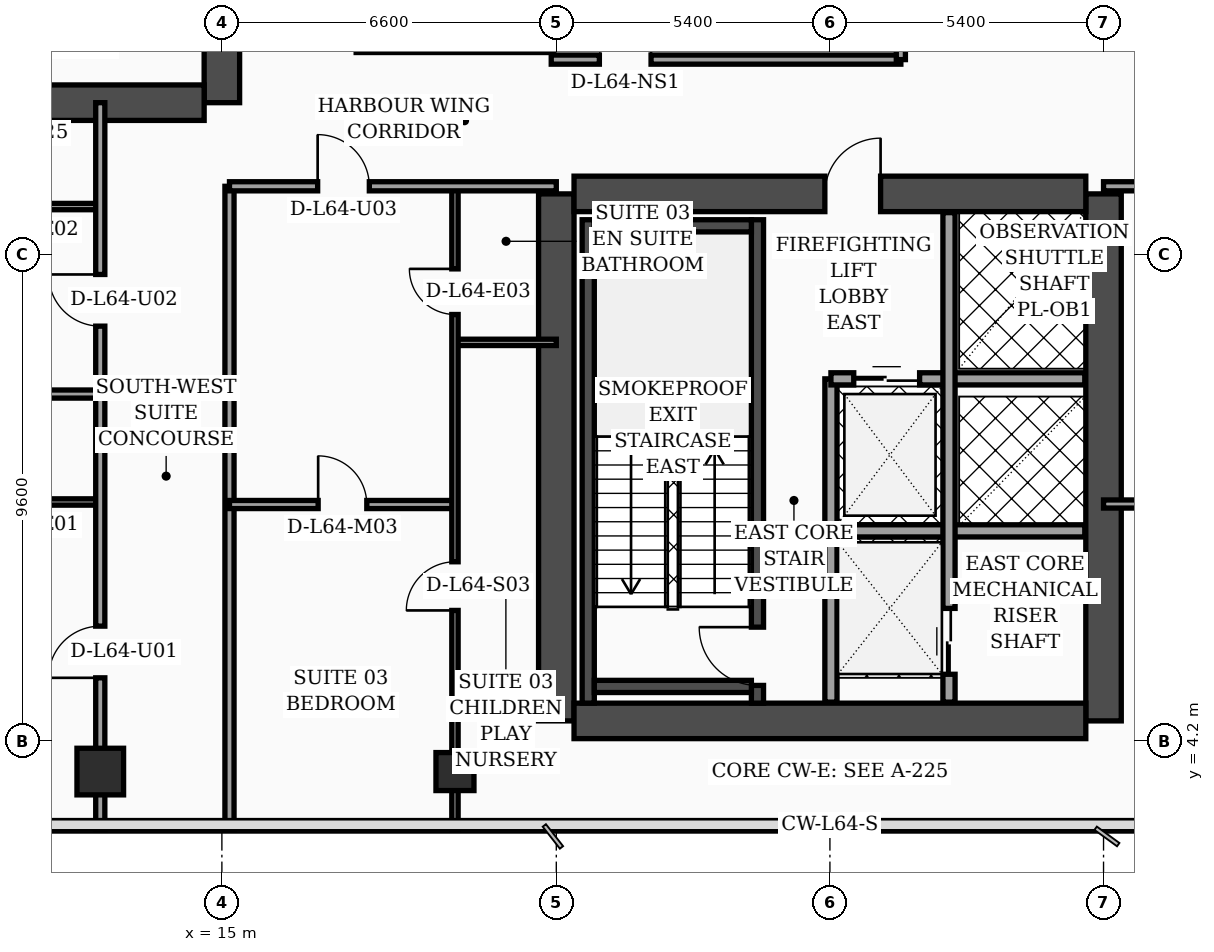
"""IFC4 building model, lengths in metres.
Left out: names, types, materials, properties, quantities, classifications, styles, units other than length and angle.
Written with IfcOpenShell. Run it as: python <this file> out.ifc"""

import sys

from ifc_helpers import new_model, si_unit, direction, frame, frame_2d, origin, origin_2d, place, context, subcontext, project, spatial, rectangle, hollow_rectangle, extrude, element, fill, save


model = new_model("IFC4")
c1 = context("Model", 3, precision=1e-05, world=origin(), true_north=direction((0.0, 1.0)))
c2 = subcontext(c1, "Body", "Model", "MODEL_VIEW")
j1 = project(units=[si_unit("LENGTHUNIT", "METRE"), si_unit("PLANEANGLEUNIT", "RADIAN")], contexts=[c1])
p1 = place(None, origin())
s1 = spatial("IfcSite", under=j1, at=p1, CompositionType="ELEMENT")
p2 = place(p1, origin())
s2 = spatial("IfcBuilding", under=s1, at=p2, CompositionType="ELEMENT")
p3 = place(p2, frame((0.0, 0.0, 259.0)))
s3 = spatial("IfcBuildingStorey", under=s2, at=p3, CompositionType="ELEMENT", Elevation=259.0)
p4 = place(p3, frame((15.0, 16.8, 0.0), z_axis=(0.0, 0.0, 1.0), x_axis=(0.0, 1.0, 0.0)))
e1 = element("IfcWall", 1, at=p4, inside=s3, PredefinedType="SHEAR", context=c2, shape_type="SweptSolid", body=[
    extrude(rectangle(XDim=21.6, YDim=0.7, at=frame_2d((10.8, 0.0))), origin(), (0.0, 0.0, 1.0), 4.05),
])
p5 = place(p4, frame((8.65, 0.0, 0.0)))
e2 = element("IfcOpeningElement", 2, at=p5, cuts=e1, PredefinedType="OPENING", context=c2, shape_type="SweptSolid", body=[
    extrude(rectangle(XDim=1.1, YDim=2.2, at=frame_2d((0.55, 1.1))), frame((0.0, 0.36, 0.0), z_axis=(0.0, -1.0, 0.0), x_axis=(1.0, 0.0, 0.0)), (0.0, 0.0, 1.0), 0.72),
])
p6 = place(p4, frame((18.9, 0.0, 0.0)))
e3 = element("IfcOpeningElement", 3, at=p6, cuts=e1, PredefinedType="OPENING", context=c2, shape_type="SweptSolid", body=[
    extrude(rectangle(XDim=1.1, YDim=2.2, at=frame_2d((0.55, 1.1))), frame((0.0, 0.36, 0.0), z_axis=(0.0, -1.0, 0.0), x_axis=(1.0, 0.0, 0.0)), (0.0, 0.0, 1.0), 0.72),
])
p7 = place(p3, frame((4.55, 16.8, 0.0), z_axis=(0.0, 0.0, 1.0), x_axis=(1.0, 0.0, 0.0)))
e4 = element("IfcWall", 4, at=p7, inside=s3, PredefinedType="SHEAR", context=c2, shape_type="SweptSolid", body=[
    extrude(rectangle(XDim=10.1, YDim=0.7, at=frame_2d((5.05, 0.0))), origin(), (0.0, 0.0, 1.0), 4.05),
])
for number, where, z_axis, x_axis in (
    (5, (21.6, 4.6, 0.0), (0.0, 0.0, 1.0), (0.0, 1.0, 0.0)),
    (6, (32.4, 4.6, 0.0), (0.0, 0.0, 1.0), (0.0, 1.0, 0.0)),
):
    element("IfcWall", number, at=place(p3, frame(where, z_axis=z_axis, x_axis=x_axis)), inside=s3, PredefinedType="SHEAR", context=c2, shape_type="SweptSolid", body=[
        extrude(rectangle(XDim=10.4, YDim=0.7, at=frame_2d((5.2, 0.0))), origin(), (0.0, 0.0, 1.0), 4.05),
    ])
p8 = place(p3, frame((21.95, 15.0, 0.0), z_axis=(0.0, 0.0, 1.0), x_axis=(1.0, 0.0, 0.0)))
e7 = element("IfcWall", 7, at=p8, inside=s3, PredefinedType="SHEAR", context=c2, shape_type="SweptSolid", body=[
    extrude(rectangle(XDim=10.1, YDim=0.7, at=frame_2d((5.05, 0.0))), origin(), (0.0, 0.0, 1.0), 4.05),
])
p9 = place(p8, frame((4.95, 0.0, 0.0)))
e8 = element("IfcOpeningElement", 8, at=p9, cuts=e7, PredefinedType="OPENING", context=c2, shape_type="SweptSolid", body=[
    extrude(rectangle(XDim=1.1, YDim=2.2, at=frame_2d((0.55, 1.1))), frame((0.0, 0.36, 0.0), z_axis=(0.0, -1.0, 0.0), x_axis=(1.0, 0.0, 0.0)), (0.0, 0.0, 1.0), 0.72),
])
p10 = place(p3, frame((21.95, 4.6, 0.0), z_axis=(0.0, 0.0, 1.0), x_axis=(1.0, 0.0, 0.0)))
e9 = element("IfcWall", 9, at=p10, inside=s3, PredefinedType="SHEAR", context=c2, shape_type="SweptSolid", body=[
    extrude(rectangle(XDim=10.1, YDim=0.7, at=frame_2d((5.05, 0.0))), origin(), (0.0, 0.0, 1.0), 4.05),
])
p11 = place(p3, frame((22.23, 4.95, 0.0), z_axis=(0.0, 0.0, 1.0), x_axis=(0.0, 1.0, 0.0)))
e10 = element("IfcWall", 10, at=p11, inside=s3, PredefinedType="SOLIDWALL", context=c2, shape_type="SweptSolid", body=[
    extrude(rectangle(XDim=9.54, YDim=0.24, at=frame_2d((4.77, 0.0))), origin(), (0.0, 0.0, 1.0), 4.05),
])
p12 = place(p3, frame((25.57, 4.95, 0.0), z_axis=(0.0, 0.0, 1.0), x_axis=(0.0, 1.0, 0.0)))
e11 = element("IfcWall", 11, at=p12, inside=s3, PredefinedType="SOLIDWALL", context=c2, shape_type="SweptSolid", body=[
    extrude(rectangle(XDim=9.54, YDim=0.24, at=frame_2d((4.77, 0.0))), origin(), (0.0, 0.0, 1.0), 4.05),
])
p13 = place(p12, frame((0.35, 0.0, 0.0)))
e12 = element("IfcOpeningElement", 12, at=p13, cuts=e11, PredefinedType="OPENING", context=c2, shape_type="SweptSolid", body=[
    extrude(rectangle(XDim=1.15, YDim=2.2, at=frame_2d((0.575, 1.1))), frame((0.0, 0.13, 0.0), z_axis=(0.0, -1.0, 0.0), x_axis=(1.0, 0.0, 0.0)), (0.0, 0.0, 1.0), 0.26),
])
for number, where, z_axis, x_axis in (
    (13, (22.35, 5.28, 0.0), (0.0, 0.0, 1.0), (1.0, 0.0, 0.0)),
    (14, (22.35, 14.37, 0.0), (0.0, 0.0, 1.0), (1.0, 0.0, 0.0)),
):
    element("IfcWall", number, at=place(p3, frame(where, z_axis=z_axis, x_axis=x_axis)), inside=s3, PredefinedType="SOLIDWALL", context=c2, shape_type="SweptSolid", body=[
        extrude(rectangle(XDim=3.1, YDim=0.24, at=frame_2d((1.55, 0.0))), origin(), (0.0, 0.0, 1.0), 4.05),
    ])
p14 = place(p3, frame((12.6, 3.6, 0.0), z_axis=(0.0, 0.0, 1.0), x_axis=(1.0, 0.0, 0.0)))
e15 = element("IfcColumn", 15, at=p14, inside=s3, PredefinedType="COLUMN", context=c2, shape_type="SweptSolid", body=[
    extrude(rectangle(XDim=0.92, YDim=0.92, at=origin_2d()), origin(), (0.0, 0.0, 1.0), 4.05),
])
p15 = place(p3, frame((19.6, 3.6, 0.0), z_axis=(0.0, 0.0, 1.0), x_axis=(1.0, 0.0, 0.0)))
e16 = element("IfcColumn", 16, at=p15, inside=s3, PredefinedType="COLUMN", context=c2, shape_type="SweptSolid", body=[
    extrude(hollow_rectangle(XDim=0.75, YDim=0.75, WallThickness=0.032, at=origin_2d()), origin(), (0.0, 0.0, 1.0), 4.05),
])
p16 = place(p3, frame((27.02, 4.97, 0.0), z_axis=(0.0, 0.0, 1.0), x_axis=(0.0, 1.0, 0.0)))
e17 = element("IfcWall", 17, at=p16, inside=s3, PredefinedType="SOLIDWALL", context=c2, shape_type="SweptSolid", body=[
    extrude(rectangle(XDim=6.38, YDim=0.24, at=frame_2d((3.19, 0.0))), origin(), (0.0, 0.0, 1.0), 4.05),
])
p17 = place(p3, frame((27.02, 11.35, 0.0), z_axis=(0.0, 0.0, 1.0), x_axis=(1.0, 0.0, 0.0)))
e18 = element("IfcWall", 18, at=p17, inside=s3, PredefinedType="SOLIDWALL", context=c2, shape_type="SweptSolid", body=[
    extrude(rectangle(XDim=5.01, YDim=0.24, at=frame_2d((2.505, 0.0))), origin(), (0.0, 0.0, 1.0), 4.05),
])
p18 = place(p17, frame((0.45, 0.0, 0.0)))
e19 = element("IfcOpeningElement", 19, at=p18, cuts=e18, PredefinedType="OPENING", context=c2, shape_type="SweptSolid", body=[
    extrude(rectangle(XDim=1.3, YDim=2.35, at=frame_2d((0.65, 1.175))), frame((0.0, 0.13, 0.0), z_axis=(0.0, -1.0, 0.0), x_axis=(1.0, 0.0, 0.0)), (0.0, 0.0, 1.0), 0.26),
])
p19 = place(p3, frame((27.02, 8.35, 0.0), z_axis=(0.0, 0.0, 1.0), x_axis=(1.0, 0.0, 0.0)))
e20 = element("IfcWall", 20, at=p19, inside=s3, PredefinedType="SOLIDWALL", context=c2, shape_type="SweptSolid", body=[
    extrude(rectangle(XDim=5.01, YDim=0.24, at=frame_2d((2.505, 0.0))), origin(), (0.0, 0.0, 1.0), 4.05),
])
p20 = place(p3, frame((29.35, 4.97, 0.0), z_axis=(0.0, 0.0, 1.0), x_axis=(0.0, 1.0, 0.0)))
e21 = element("IfcWall", 21, at=p20, inside=s3, PredefinedType="SOLIDWALL", context=c2, shape_type="SweptSolid", body=[
    extrude(rectangle(XDim=9.66, YDim=0.24, at=frame_2d((4.83, 0.0))), origin(), (0.0, 0.0, 1.0), 4.05),
])
p21 = place(p20, frame((0.55, 0.0, 0.0)))
e22 = element("IfcOpeningElement", 22, at=p21, cuts=e21, PredefinedType="OPENING", context=c2, shape_type="SweptSolid", body=[
    extrude(rectangle(XDim=1.3, YDim=2.35, at=frame_2d((0.65, 1.175))), frame((0.0, 0.13, 0.0), z_axis=(0.0, -1.0, 0.0), x_axis=(1.0, 0.0, 0.0)), (0.0, 0.0, 1.0), 0.26),
])
p22 = place(p3, frame((3.2, 8.92, 0.0), z_axis=(0.0, 0.0, 1.0), x_axis=(1.0, 0.0, 0.0)))
e23 = element("IfcWall", 23, at=p22, inside=s3, PredefinedType="PARTITIONING", context=c2, shape_type="SweptSolid", body=[
    extrude(rectangle(XDim=9.4, YDim=0.125, at=frame_2d((4.7, 0.0))), origin(), (0.0, 0.0, 1.0), 3.5),
])
p23 = place(p22, frame((3.3, 0.0, 0.0)))
e24 = element("IfcOpeningElement", 24, at=p23, cuts=e23, PredefinedType="OPENING", context=c2, shape_type="SweptSolid", body=[
    extrude(rectangle(XDim=0.96, YDim=2.2, at=frame_2d((0.48, 1.1))), frame((0.0, 0.073, 0.0), z_axis=(0.0, -1.0, 0.0), x_axis=(1.0, 0.0, 0.0)), (0.0, 0.0, 1.0), 0.145),
])
p24 = place(p22, frame((7.49, 0.0, 0.0)))
e25 = element("IfcOpeningElement", 25, at=p24, cuts=e23, PredefinedType="OPENING", context=c2, shape_type="SweptSolid", body=[
    extrude(rectangle(XDim=0.9, YDim=2.15, at=frame_2d((0.45, 1.075))), frame((0.0, 0.073, 0.0), z_axis=(0.0, -1.0, 0.0), x_axis=(1.0, 0.0, 0.0)), (0.0, 0.0, 1.0), 0.145),
])
p25 = place(p3, frame((0.08, 14.75, 0.0), z_axis=(0.0, 0.0, 1.0), x_axis=(1.0, 0.0, 0.0)))
e26 = element("IfcWall", 26, at=p25, inside=s3, PredefinedType="PARTITIONING", context=c2, shape_type="SweptSolid", body=[
    extrude(rectangle(XDim=12.52, YDim=0.125, at=frame_2d((6.26, 0.0))), origin(), (0.0, 0.0, 1.0), 3.5),
])
p26 = place(p25, frame((4.32, 0.0, 0.0)))
e27 = element("IfcOpeningElement", 27, at=p26, cuts=e26, PredefinedType="OPENING", context=c2, shape_type="SweptSolid", body=[
    extrude(rectangle(XDim=0.96, YDim=2.2, at=frame_2d((0.48, 1.1))), frame((0.0, 0.073, 0.0), z_axis=(0.0, -1.0, 0.0), x_axis=(1.0, 0.0, 0.0)), (0.0, 0.0, 1.0), 0.145),
])
p27 = place(p25, frame((10.61, 0.0, 0.0)))
e28 = element("IfcOpeningElement", 28, at=p27, cuts=e26, PredefinedType="OPENING", context=c2, shape_type="SweptSolid", body=[
    extrude(rectangle(XDim=0.9, YDim=2.15, at=frame_2d((0.45, 1.075))), frame((0.0, 0.073, 0.0), z_axis=(0.0, -1.0, 0.0), x_axis=(1.0, 0.0, 0.0)), (0.0, 0.0, 1.0), 0.145),
])
p28 = place(p3, frame((0.08, 11.05, 0.0), z_axis=(0.0, 0.0, 1.0), x_axis=(1.0, 0.0, 0.0)))
e29 = element("IfcWall", 29, at=p28, inside=s3, PredefinedType="PARTITIONING", context=c2, shape_type="SweptSolid", body=[
    extrude(rectangle(XDim=12.52, YDim=0.16, at=frame_2d((6.26, 0.0))), origin(), (0.0, 0.0, 1.0), 3.5),
])
p29 = place(p3, frame((12.6, 2.44, 0.0), z_axis=(0.0, 0.0, 1.0), x_axis=(0.0, 1.0, 0.0)))
e30 = element("IfcWall", 30, at=p29, inside=s3, PredefinedType="PARTITIONING", context=c2, shape_type="SweptSolid", body=[
    extrude(rectangle(XDim=14.36, YDim=0.18, at=frame_2d((7.18, 0.0))), origin(), (0.0, 0.0, 1.0), 2.35),
])
p30 = place(p29, frame((3.01, 0.0, 0.0)))
e31 = element("IfcOpeningElement", 31, at=p30, cuts=e30, PredefinedType="OPENING", context=c2, shape_type="SweptSolid", body=[
    extrude(rectangle(XDim=1.02, YDim=2.2, at=frame_2d((0.51, 1.1))), frame((0.0, 0.1, 0.0), z_axis=(0.0, -1.0, 0.0), x_axis=(1.0, 0.0, 0.0)), (0.0, 0.0, 1.0), 0.2),
])
p31 = place(p29, frame((9.95, 0.0, 0.0)))
e32 = element("IfcOpeningElement", 32, at=p31, cuts=e30, PredefinedType="OPENING", context=c2, shape_type="SweptSolid", body=[
    extrude(rectangle(XDim=1.02, YDim=2.2, at=frame_2d((0.51, 1.1))), frame((0.0, 0.1, 0.0), z_axis=(0.0, -1.0, 0.0), x_axis=(1.0, 0.0, 0.0)), (0.0, 0.0, 1.0), 0.2),
])
p32 = place(p3, frame((15.15, 2.44, 0.0), z_axis=(0.0, 0.0, 1.0), x_axis=(0.0, 1.0, 0.0)))
e33 = element("IfcWall", 33, at=p32, inside=s3, PredefinedType="PARTITIONING", context=c2, shape_type="SweptSolid", body=[
    extrude(rectangle(XDim=12.71, YDim=0.18, at=frame_2d((6.355, 0.0))), origin(), (0.0, 0.0, 1.0), 2.35),
])
p33 = place(p3, frame((19.6, 12.07, 0.0), z_axis=(0.0, 0.0, 1.0), x_axis=(1.0, 0.0, 0.0)))
e34 = element("IfcWall", 34, at=p33, inside=s3, PredefinedType="PARTITIONING", context=c2, shape_type="SweptSolid", body=[
    extrude(rectangle(XDim=2.0, YDim=0.125, at=frame_2d((1.0, 0.0))), origin(), (0.0, 0.0, 1.0), 4.05),
])
p34 = place(p3, frame((15.15, 8.87, 0.0), z_axis=(0.0, 0.0, 1.0), x_axis=(1.0, 0.0, 0.0)))
e35 = element("IfcWall", 35, at=p34, inside=s3, PredefinedType="PARTITIONING", context=c2, shape_type="SweptSolid", body=[
    extrude(rectangle(XDim=4.45, YDim=0.16, at=frame_2d((2.225, 0.0))), origin(), (0.0, 0.0, 1.0), 4.05),
])
p35 = place(p34, frame((1.75, 0.0, 0.0)))
e36 = element("IfcOpeningElement", 36, at=p35, cuts=e35, PredefinedType="OPENING", context=c2, shape_type="SweptSolid", body=[
    extrude(rectangle(XDim=0.96, YDim=2.2, at=frame_2d((0.48, 1.1))), frame((0.0, 0.09, 0.0), z_axis=(0.0, -1.0, 0.0), x_axis=(1.0, 0.0, 0.0)), (0.0, 0.0, 1.0), 0.18),
])
p36 = place(p3, frame((19.6, 2.44, 0.0), z_axis=(0.0, 0.0, 1.0), x_axis=(0.0, 1.0, 0.0)))
e37 = element("IfcWall", 37, at=p36, inside=s3, PredefinedType="PARTITIONING", context=c2, shape_type="SweptSolid", body=[
    extrude(rectangle(XDim=12.71, YDim=0.125, at=frame_2d((6.355, 0.0))), origin(), (0.0, 0.0, 1.0), 2.35),
])
p37 = place(p36, frame((4.34, 0.0, 0.0)))
e38 = element("IfcOpeningElement", 38, at=p37, cuts=e37, PredefinedType="OPENING", context=c2, shape_type="SweptSolid", body=[
    extrude(rectangle(XDim=0.96, YDim=2.2, at=frame_2d((0.48, 1.1))), frame((0.0, 0.073, 0.0), z_axis=(0.0, -1.0, 0.0), x_axis=(1.0, 0.0, 0.0)), (0.0, 0.0, 1.0), 0.145),
])
p38 = place(p36, frame((10.18, 0.0, 0.0)))
e39 = element("IfcOpeningElement", 39, at=p38, cuts=e37, PredefinedType="OPENING", context=c2, shape_type="SweptSolid", body=[
    extrude(rectangle(XDim=0.9, YDim=2.15, at=frame_2d((0.45, 1.075))), frame((0.0, 0.073, 0.0), z_axis=(0.0, -1.0, 0.0), x_axis=(1.0, 0.0, 0.0)), (0.0, 0.0, 1.0), 0.145),
])
p39 = place(p3, frame((15.15, 15.15, 0.0), z_axis=(0.0, 0.0, 1.0), x_axis=(1.0, 0.0, 0.0)))
e40 = element("IfcWall", 40, at=p39, inside=s3, PredefinedType="PARTITIONING", context=c2, shape_type="SweptSolid", body=[
    extrude(rectangle(XDim=6.45, YDim=0.18, at=frame_2d((3.225, 0.0))), origin(), (0.0, 0.0, 1.0), 2.35),
])
p40 = place(p39, frame((1.74, 0.0, 0.0)))
e41 = element("IfcOpeningElement", 41, at=p40, cuts=e40, PredefinedType="OPENING", context=c2, shape_type="SweptSolid", body=[
    extrude(rectangle(XDim=1.02, YDim=2.2, at=frame_2d((0.51, 1.1))), frame((0.0, 0.1, 0.0), z_axis=(0.0, -1.0, 0.0), x_axis=(1.0, 0.0, 0.0)), (0.0, 0.0, 1.0), 0.2),
])
p41 = place(p3, frame((17.65, 17.88, 0.0), z_axis=(0.0, 0.0, 1.0), x_axis=(1.0, 0.0, 0.0)))
e42 = element("IfcWall", 42, at=p41, inside=s3, PredefinedType="PARTITIONING", context=c2, shape_type="SweptSolid", body=[
    extrude(rectangle(XDim=3.9, YDim=0.18, at=frame_2d((1.95, 0.0))), origin(), (0.0, 0.0, 1.0), 4.05),
])
p42 = place(p3, frame((32.4, 8.88, 0.0), z_axis=(0.0, 0.0, 1.0), x_axis=(1.0, 0.0, 0.0)))
e43 = element("IfcWall", 43, at=p42, inside=s3, PredefinedType="PARTITIONING", context=c2, shape_type="SweptSolid", body=[
    extrude(rectangle(XDim=5.49, YDim=0.16, at=frame_2d((2.745, 0.0))), origin(), (0.0, 0.0, 1.0), 3.5),
])
p43 = place(p42, frame((2.27, 0.0, 0.0)))
e44 = element("IfcOpeningElement", 44, at=p43, cuts=e43, PredefinedType="OPENING", context=c2, shape_type="SweptSolid", body=[
    extrude(rectangle(XDim=0.96, YDim=2.2, at=frame_2d((0.48, 1.1))), frame((0.0, 0.09, 0.0), z_axis=(0.0, -1.0, 0.0), x_axis=(1.0, 0.0, 0.0)), (0.0, 0.0, 1.0), 0.18),
])
p44 = place(p3, frame((32.4, 15.15, 0.0), z_axis=(0.0, 0.0, 1.0), x_axis=(1.0, 0.0, 0.0)))
e45 = element("IfcWall", 45, at=p44, inside=s3, PredefinedType="PARTITIONING", context=c2, shape_type="SweptSolid", body=[
    extrude(rectangle(XDim=7.6, YDim=0.18, at=frame_2d((3.8, 0.0))), origin(), (0.0, 0.0, 1.0), 2.35),
])
p45 = place(p44, frame((2.33, 0.0, 0.0)))
e46 = element("IfcOpeningElement", 46, at=p45, cuts=e45, PredefinedType="OPENING", context=c2, shape_type="SweptSolid", body=[
    extrude(rectangle(XDim=1.02, YDim=2.2, at=frame_2d((0.51, 1.1))), frame((0.0, 0.1, 0.0), z_axis=(0.0, -1.0, 0.0), x_axis=(1.0, 0.0, 0.0)), (0.0, 0.0, 1.0), 0.2),
])
p46 = place(p3, frame((21.5, 17.65, 0.0), z_axis=(0.0, 0.0, 1.0), x_axis=(1.0, 0.0, 0.0)))
e47 = element("IfcWall", 47, at=p46, inside=s3, PredefinedType="PARTITIONING", context=c2, shape_type="SweptSolid", body=[
    extrude(rectangle(XDim=6.9, YDim=0.18, at=frame_2d((3.45, 0.0))), origin(), (0.0, 0.0, 1.0), 2.35),
])
p47 = place(p46, frame((0.95, 0.0, 0.0)))
e48 = element("IfcOpeningElement", 48, at=p47, cuts=e47, PredefinedType="OPENING", context=c2, shape_type="SweptSolid", body=[
    extrude(rectangle(XDim=1.02, YDim=2.2, at=frame_2d((0.51, 1.1))), frame((0.0, 0.1, 0.0), z_axis=(0.0, -1.0, 0.0), x_axis=(1.0, 0.0, 0.0)), (0.0, 0.0, 1.0), 0.2),
])
p48 = place(p3, frame((28.4, 17.65, 0.0), z_axis=(0.0, 0.0, 1.0), x_axis=(0.0, 1.0, 0.0)))
e49 = element("IfcWall", 49, at=p48, inside=s3, PredefinedType="PARTITIONING", context=c2, shape_type="SweptSolid", body=[
    extrude(rectangle(XDim=14.67, YDim=0.18, at=frame_2d((7.335, 0.0))), origin(), (0.0, 0.0, 1.0), 2.35),
])
p49 = place(p18, origin())
e50 = element("IfcDoor", 50, at=p49, inside=s3, OperationType="DOUBLE_DOOR_SLIDING", PredefinedType="DOOR", context=c2, shape_type="SweptSolid", body=[
    extrude(rectangle(XDim=1.3, YDim=2.35, at=frame_2d((0.65, 1.175))), frame((0.0, 0.025, 0.0), z_axis=(0.0, -1.0, 0.0), x_axis=(1.0, 0.0, 0.0)), (0.0, 0.0, 1.0), 0.05),
])
fill(e19, e50)
p50 = place(p21, origin())
e51 = element("IfcDoor", 51, at=p50, inside=s3, OperationType="DOUBLE_DOOR_SLIDING", PredefinedType="DOOR", context=c2, shape_type="SweptSolid", body=[
    extrude(rectangle(XDim=1.3, YDim=2.35, at=frame_2d((0.65, 1.175))), frame((0.0, 0.025, 0.0), z_axis=(0.0, -1.0, 0.0), x_axis=(1.0, 0.0, 0.0)), (0.0, 0.0, 1.0), 0.05),
])
fill(e22, e51)
p51 = place(p30, origin())
e52 = element("IfcDoor", 52, at=p51, inside=s3, OperationType="SINGLE_SWING_LEFT", PredefinedType="DOOR", context=c2, shape_type="SweptSolid", body=[
    extrude(rectangle(XDim=1.02, YDim=2.2, at=frame_2d((0.51, 1.1))), frame((0.0, 0.025, 0.0), z_axis=(0.0, -1.0, 0.0), x_axis=(1.0, 0.0, 0.0)), (0.0, 0.0, 1.0), 0.05),
])
fill(e31, e52)
p52 = place(p31, origin())
e53 = element("IfcDoor", 53, at=p52, inside=s3, OperationType="SINGLE_SWING_RIGHT", PredefinedType="DOOR", context=c2, shape_type="SweptSolid", body=[
    extrude(rectangle(XDim=1.02, YDim=2.2, at=frame_2d((0.51, 1.1))), frame((0.0, 0.025, 0.0), z_axis=(0.0, -1.0, 0.0), x_axis=(1.0, 0.0, 0.0)), (0.0, 0.0, 1.0), 0.05),
])
fill(e32, e53)
p53 = place(p35, origin())
e54 = element("IfcDoor", 54, at=p53, inside=s3, OperationType="SINGLE_SWING_LEFT", PredefinedType="DOOR", context=c2, shape_type="SweptSolid", body=[
    extrude(rectangle(XDim=0.96, YDim=2.2, at=frame_2d((0.48, 1.1))), frame((0.0, 0.025, 0.0), z_axis=(0.0, -1.0, 0.0), x_axis=(1.0, 0.0, 0.0)), (0.0, 0.0, 1.0), 0.05),
])
fill(e36, e54)
p54 = place(p37, origin())
e55 = element("IfcDoor", 55, at=p54, inside=s3, OperationType="SINGLE_SWING_LEFT", PredefinedType="DOOR", context=c2, shape_type="SweptSolid", body=[
    extrude(rectangle(XDim=0.96, YDim=2.2, at=frame_2d((0.48, 1.1))), frame((0.0, 0.025, 0.0), z_axis=(0.0, -1.0, 0.0), x_axis=(1.0, 0.0, 0.0)), (0.0, 0.0, 1.0), 0.05),
])
fill(e38, e55)
p55 = place(p38, origin())
e56 = element("IfcDoor", 56, at=p55, inside=s3, OperationType="SINGLE_SWING_RIGHT", PredefinedType="DOOR", context=c2, shape_type="SweptSolid", body=[
    extrude(rectangle(XDim=0.9, YDim=2.15, at=frame_2d((0.45, 1.075))), frame((0.0, 0.025, 0.0), z_axis=(0.0, -1.0, 0.0), x_axis=(1.0, 0.0, 0.0)), (0.0, 0.0, 1.0), 0.05),
])
fill(e39, e56)
p56 = place(p40, origin())
e57 = element("IfcDoor", 57, at=p56, inside=s3, OperationType="SINGLE_SWING_LEFT", PredefinedType="DOOR", context=c2, shape_type="SweptSolid", body=[
    extrude(rectangle(XDim=1.02, YDim=2.2, at=frame_2d((0.51, 1.1))), frame((0.0, 0.025, 0.0), z_axis=(0.0, -1.0, 0.0), x_axis=(1.0, 0.0, 0.0)), (0.0, 0.0, 1.0), 0.05),
])
fill(e41, e57)
p57 = place(p47, origin())
e58 = element("IfcDoor", 58, at=p57, inside=s3, OperationType="SINGLE_SWING_RIGHT", PredefinedType="DOOR", context=c2, shape_type="SweptSolid", body=[
    extrude(rectangle(XDim=1.02, YDim=2.2, at=frame_2d((0.51, 1.1))), frame((0.0, 0.025, 0.0), z_axis=(0.0, -1.0, 0.0), x_axis=(1.0, 0.0, 0.0)), (0.0, 0.0, 1.0), 0.05),
])
fill(e48, e58)
p58 = place(p13, origin())
e59 = element("IfcDoor", 59, at=p58, inside=s3, OperationType="SINGLE_SWING_RIGHT", PredefinedType="DOOR", context=c2, shape_type="SweptSolid", body=[
    extrude(rectangle(XDim=1.15, YDim=2.2, at=frame_2d((0.575, 1.1))), frame((0.0, 0.025, 0.0), z_axis=(0.0, -1.0, 0.0), x_axis=(1.0, 0.0, 0.0)), (0.0, 0.0, 1.0), 0.05),
])
fill(e12, e59)
p59 = place(p9, origin())
e60 = element("IfcDoor", 60, at=p59, inside=s3, OperationType="SINGLE_SWING_RIGHT", PredefinedType="DOOR", context=c2, shape_type="SweptSolid", body=[
    extrude(rectangle(XDim=1.1, YDim=2.2, at=frame_2d((0.55, 1.1))), frame((0.0, 0.025, 0.0), z_axis=(0.0, -1.0, 0.0), x_axis=(1.0, 0.0, 0.0)), (0.0, 0.0, 1.0), 0.05),
])
fill(e8, e60)
save(model, sys.argv[1])
